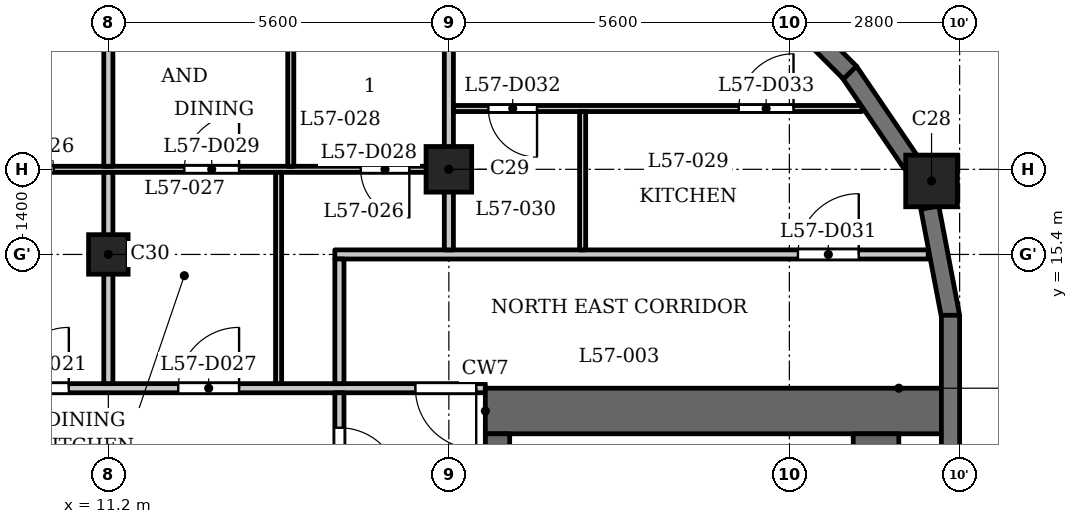
"""IFC4 building model, lengths in metres.
Left out: names, types, materials, properties, quantities, classifications, styles, units other than length and angle.
Written with IfcOpenShell. Run it as: python <this file> out.ifc"""

import sys

from ifc_helpers import new_model, si_unit, direction, frame, frame_2d, origin, origin_2d, place, context, subcontext, project, spatial, rectangle, extrude, element, fill, save


model = new_model("IFC4")
c1 = context("Model", 3, precision=1e-05, world=origin(), true_north=direction((0.0, 1.0)))
c2 = subcontext(c1, "Body", "Model", "MODEL_VIEW")
j1 = project(units=[si_unit("LENGTHUNIT", "METRE"), si_unit("PLANEANGLEUNIT", "RADIAN")], contexts=[c1])
p1 = place(None, origin())
s1 = spatial("IfcSite", under=j1, at=p1, CompositionType="ELEMENT")
p2 = place(p1, origin())
s2 = spatial("IfcBuilding", under=s1, at=p2, CompositionType="ELEMENT")
p3 = place(p2, frame((0.0, 0.0, 220.4)))
s3 = spatial("IfcBuildingStorey", under=s2, at=p3, CompositionType="ELEMENT", Elevation=220.4)
p4 = place(p3, frame((24.738, 16.609, 0.0), z_axis=(0.0, 0.0, 1.0), x_axis=(1.0, 0.0, 0.0)))
e1 = element("IfcColumn", 1, at=p4, inside=s3, PredefinedType="COLUMN", context=c2, shape_type="SweptSolid", body=[
    extrude(rectangle(XDim=0.85, YDim=0.85, at=origin_2d()), origin(), (0.0, 0.0, 1.0), 3.5),
])
p5 = place(p3, frame((16.8, 16.8, 0.0), z_axis=(0.0, 0.0, 1.0), x_axis=(1.0, 0.0, 0.0)))
e2 = element("IfcColumn", 2, at=p5, inside=s3, PredefinedType="COLUMN", context=c2, shape_type="SweptSolid", body=[
    extrude(rectangle(XDim=0.75, YDim=0.75, at=origin_2d()), origin(), (0.0, 0.0, 1.0), 3.5),
])
p6 = place(p3, frame((11.2, 15.4, 0.0), z_axis=(0.0, 0.0, 1.0), x_axis=(1.0, 0.0, 0.0)))
e3 = element("IfcColumn", 3, at=p6, inside=s3, PredefinedType="COLUMN", context=c2, shape_type="SweptSolid", body=[
    extrude(rectangle(XDim=0.65, YDim=0.65, at=origin_2d()), origin(), (0.0, 0.0, 1.0), 3.5),
])
p7 = place(p3, frame((25.05, 11.625, 0.0), z_axis=(0.0, 0.0, 1.0), x_axis=(0.0, 1.0, 0.0)))
e4 = element("IfcWall", 4, at=p7, inside=s3, PredefinedType="SOLIDWALL", context=c2, shape_type="SweptSolid", body=[
    extrude(rectangle(XDim=2.775, YDim=0.3, at=frame_2d((1.387, 0.0))), origin(), (0.0, 0.0, 1.0), 2.5),
])
for number, where, z_axis, x_axis in (
    (5, (25.053, 14.372, 0.0), (0.0, 0.0, 1.0), (-0.187, 0.982, 0.0)),
    (6, (24.408, 16.898, 0.0), (0.0, 0.0, 1.0), (-0.562, 0.827, 0.0)),
):
    element("IfcWall", number, at=place(p3, frame(where, z_axis=z_axis, x_axis=x_axis)), inside=s3, PredefinedType="SOLIDWALL", context=c2, shape_type="SweptSolid", body=[
        extrude(rectangle(XDim=1.831, YDim=0.3, at=frame_2d((0.916, 0.0))), origin(), (0.0, 0.0, 1.0), 2.5),
    ])
p8 = place(p3, frame((23.397, 18.391, 0.0), z_axis=(0.0, 0.0, 1.0), x_axis=(-0.707106781187, 0.707106781187, 0.0)))
e7 = element("IfcWall", 7, at=p8, inside=s3, PredefinedType="SOLIDWALL", context=c2, shape_type="SweptSolid", body=[
    extrude(rectangle(XDim=2.775, YDim=0.3, at=frame_2d((1.388, 0.0))), origin(), (0.0, 0.0, 1.0), 2.5),
])
p9 = place(p8, frame((0.788, 0.0, 0.6)))
e8 = element("IfcOpeningElement", 8, at=p9, cuts=e7, PredefinedType="OPENING", context=c2, shape_type="SweptSolid", body=[
    extrude(rectangle(XDim=1.2, YDim=1.55, at=frame_2d((0.6, 0.775))), frame((0.0, 0.16, 0.0), z_axis=(0.0, -1.0, 0.0), x_axis=(1.0, 0.0, 0.0)), (0.0, 0.0, 1.0), 0.32),
])
p10 = place(p3, frame((17.4, 12.825, 0.0), z_axis=(0.0, 0.0, 1.0), x_axis=(1.0, 0.0, 0.0)))
e9 = element("IfcWall", 9, at=p10, inside=s3, PredefinedType="SHEAR", context=c2, shape_type="SweptSolid", body=[
    extrude(rectangle(XDim=7.6, YDim=0.75, at=frame_2d((3.8, 0.0))), origin(), (0.0, 0.0, 1.0), 3.2),
])
p11 = place(p3, frame((17.6, -12.45, 0.0), z_axis=(0.0, 0.0, 1.0), x_axis=(0.0, 1.0, 0.0)))
e10 = element("IfcWall", 10, at=p11, inside=s3, PredefinedType="SHEAR", context=c2, shape_type="SweptSolid", body=[
    extrude(rectangle(XDim=24.9, YDim=0.4, at=frame_2d((12.45, 0.0))), origin(), (0.0, 0.0, 1.0), 3.2),
])
p12 = place(p11, frame((6.85, 0.0, 0.0)))
e11 = element("IfcOpeningElement", 11, at=p12, cuts=e10, PredefinedType="OPENING", context=c2, shape_type="SweptSolid", body=[
    extrude(rectangle(XDim=0.9, YDim=2.1, at=frame_2d((0.45, 1.05))), frame((0.0, 0.21, 0.0), z_axis=(0.0, -1.0, 0.0), x_axis=(1.0, 0.0, 0.0)), (0.0, 0.0, 1.0), 0.42),
])
p13 = place(p11, frame((10.45, 0.0, 0.0)))
e12 = element("IfcOpeningElement", 12, at=p13, cuts=e10, PredefinedType="OPENING", context=c2, shape_type="SweptSolid", body=[
    extrude(rectangle(XDim=0.9, YDim=2.1, at=frame_2d((0.45, 1.05))), frame((0.0, 0.21, 0.0), z_axis=(0.0, -1.0, 0.0), x_axis=(1.0, 0.0, 0.0)), (0.0, 0.0, 1.0), 0.42),
])
p14 = place(p11, frame((15.6, 0.0, 0.0)))
e13 = element("IfcOpeningElement", 13, at=p14, cuts=e10, PredefinedType="OPENING", context=c2, shape_type="SweptSolid", body=[
    extrude(rectangle(XDim=1.1, YDim=2.1, at=frame_2d((0.55, 1.05))), frame((0.0, 0.21, 0.0), z_axis=(0.0, -1.0, 0.0), x_axis=(1.0, 0.0, 0.0)), (0.0, 0.0, 1.0), 0.42),
])
p15 = place(p11, frame((18.0, 0.0, 0.0)))
e14 = element("IfcOpeningElement", 14, at=p15, cuts=e10, PredefinedType="OPENING", context=c2, shape_type="SweptSolid", body=[
    extrude(rectangle(XDim=1.1, YDim=2.1, at=frame_2d((0.55, 1.05))), frame((0.0, 0.21, 0.0), z_axis=(0.0, -1.0, 0.0), x_axis=(1.0, 0.0, 0.0)), (0.0, 0.0, 1.0), 0.42),
])
p16 = place(p11, frame((23.025, 0.0, 0.0)))
e15 = element("IfcOpeningElement", 15, at=p16, cuts=e10, PredefinedType="OPENING", context=c2, shape_type="SweptSolid", body=[
    extrude(rectangle(XDim=1.1, YDim=2.1, at=frame_2d((0.55, 1.05))), frame((0.0, 0.21, 0.0), z_axis=(0.0, -1.0, 0.0), x_axis=(1.0, 0.0, 0.0)), (0.0, 0.0, 1.0), 0.42),
])
p17 = place(p11, frame((0.775, 0.0, 0.0)))
e16 = element("IfcOpeningElement", 16, at=p17, cuts=e10, PredefinedType="OPENING", context=c2, shape_type="SweptSolid", body=[
    extrude(rectangle(XDim=1.1, YDim=2.1, at=frame_2d((0.55, 1.05))), frame((0.0, 0.21, 0.0), z_axis=(0.0, -1.0, 0.0), x_axis=(1.0, 0.0, 0.0)), (0.0, 0.0, 1.0), 0.42),
])
p18 = place(p11, frame((12.925, 0.0, 0.0)))
e17 = element("IfcOpeningElement", 17, at=p18, cuts=e10, PredefinedType="OPENING", context=c2, shape_type="SweptSolid", body=[
    extrude(rectangle(XDim=1.8, YDim=2.1, at=frame_2d((0.9, 1.05))), frame((0.0, 0.21, 0.0), z_axis=(0.0, -1.0, 0.0), x_axis=(1.0, 0.0, 0.0)), (0.0, 0.0, 1.0), 0.42),
])
p19 = place(p3, frame((23.825, -12.45, 0.0), z_axis=(0.0, 0.0, 1.0), x_axis=(0.0, 1.0, 0.0)))
e18 = element("IfcWall", 18, at=p19, inside=s3, PredefinedType="SHEAR", context=c2, shape_type="SweptSolid", body=[
    extrude(rectangle(XDim=24.9, YDim=0.75, at=frame_2d((12.45, 0.0))), origin(), (0.0, 0.0, 1.0), 3.2),
])
p20 = place(p3, frame((-17.4, 13.2, 0.0), z_axis=(0.0, 0.0, 1.0), x_axis=(1.0, 0.0, 0.0)))
e19 = element("IfcWall", 19, at=p20, inside=s3, PredefinedType="PARTITIONING", context=c2, shape_type="SweptSolid", body=[
    extrude(rectangle(XDim=34.8, YDim=0.15, at=frame_2d((17.4, 0.0))), origin(), (0.0, 0.0, 1.0), 3.2),
])
p21 = place(p20, frame((0.25, 0.0, 0.0)))
e20 = element("IfcOpeningElement", 20, at=p21, cuts=e19, PredefinedType="OPENING", context=c2, shape_type="SweptSolid", body=[
    extrude(rectangle(XDim=1.0, YDim=2.1, at=frame_2d((0.5, 1.05))), frame((0.0, 0.085, 0.0), z_axis=(0.0, -1.0, 0.0), x_axis=(1.0, 0.0, 0.0)), (0.0, 0.0, 1.0), 0.17),
])
p22 = place(p20, frame((33.65, 0.0, 0.0)))
e21 = element("IfcOpeningElement", 21, at=p22, cuts=e19, PredefinedType="OPENING", context=c2, shape_type="SweptSolid", body=[
    extrude(rectangle(XDim=1.0, YDim=2.1, at=frame_2d((0.5, 1.05))), frame((0.0, 0.085, 0.0), z_axis=(0.0, -1.0, 0.0), x_axis=(1.0, 0.0, 0.0)), (0.0, 0.0, 1.0), 0.17),
])
p23 = place(p20, frame((15.75, 0.0, 0.0)))
e22 = element("IfcOpeningElement", 22, at=p23, cuts=e19, PredefinedType="OPENING", context=c2, shape_type="SweptSolid", body=[
    extrude(rectangle(XDim=1.0, YDim=2.1, at=frame_2d((0.5, 1.05))), frame((0.0, 0.085, 0.0), z_axis=(0.0, -1.0, 0.0), x_axis=(1.0, 0.0, 0.0)), (0.0, 0.0, 1.0), 0.17),
])
p24 = place(p20, frame((26.95, 0.0, 0.0)))
e23 = element("IfcOpeningElement", 23, at=p24, cuts=e19, PredefinedType="OPENING", context=c2, shape_type="SweptSolid", body=[
    extrude(rectangle(XDim=1.0, YDim=2.1, at=frame_2d((0.5, 1.05))), frame((0.0, 0.085, 0.0), z_axis=(0.0, -1.0, 0.0), x_axis=(1.0, 0.0, 0.0)), (0.0, 0.0, 1.0), 0.17),
])
p25 = place(p20, frame((29.75, 0.0, 0.0)))
e24 = element("IfcOpeningElement", 24, at=p25, cuts=e19, PredefinedType="OPENING", context=c2, shape_type="SweptSolid", body=[
    extrude(rectangle(XDim=1.0, YDim=2.1, at=frame_2d((0.5, 1.05))), frame((0.0, 0.085, 0.0), z_axis=(0.0, -1.0, 0.0), x_axis=(1.0, 0.0, 0.0)), (0.0, 0.0, 1.0), 0.17),
])
p26 = place(p3, frame((14.925, 15.4, 0.0), z_axis=(0.0, 0.0, 1.0), x_axis=(1.0, 0.0, 0.0)))
e25 = element("IfcWall", 25, at=p26, inside=s3, PredefinedType="PARTITIONING", context=c2, shape_type="SweptSolid", body=[
    extrude(rectangle(XDim=9.759, YDim=0.15, at=frame_2d((4.879, 0.0))), origin(), (0.0, 0.0, 1.0), 3.2),
])
p27 = place(p26, frame((7.616, 0.0, 0.0)))
e26 = element("IfcOpeningElement", 26, at=p27, cuts=e25, PredefinedType="OPENING", context=c2, shape_type="SweptSolid", body=[
    extrude(rectangle(XDim=1.0, YDim=2.1, at=frame_2d((0.5, 1.05))), frame((0.0, 0.085, 0.0), z_axis=(0.0, -1.0, 0.0), x_axis=(1.0, 0.0, 0.0)), (0.0, 0.0, 1.0), 0.17),
])
p28 = place(p3, frame((-16.725, 16.8, 0.0), z_axis=(0.0, 0.0, 1.0), x_axis=(1.0, 0.0, 0.0)))
e27 = element("IfcWall", 27, at=p28, inside=s3, PredefinedType="PARTITIONING", context=c2, shape_type="SweptSolid", body=[
    extrude(rectangle(XDim=33.45, YDim=0.1, at=frame_2d((16.725, 0.0))), origin(), (0.0, 0.0, 1.0), 3.2),
])
p29 = place(p28, frame((11.675, 0.0, 0.0)))
e28 = element("IfcOpeningElement", 28, at=p29, cuts=e27, PredefinedType="OPENING", context=c2, shape_type="SweptSolid", body=[
    extrude(rectangle(XDim=0.9, YDim=2.1, at=frame_2d((0.45, 1.05))), frame((0.0, 0.06, 0.0), z_axis=(0.0, -1.0, 0.0), x_axis=(1.0, 0.0, 0.0)), (0.0, 0.0, 1.0), 0.12),
])
p30 = place(p28, frame((9.575, 0.0, 0.0)))
e29 = element("IfcOpeningElement", 29, at=p30, cuts=e27, PredefinedType="OPENING", context=c2, shape_type="SweptSolid", body=[
    extrude(rectangle(XDim=0.9, YDim=2.1, at=frame_2d((0.45, 1.05))), frame((0.0, 0.06, 0.0), z_axis=(0.0, -1.0, 0.0), x_axis=(1.0, 0.0, 0.0)), (0.0, 0.0, 1.0), 0.12),
])
p31 = place(p28, frame((17.375, 0.0, 0.0)))
e30 = element("IfcOpeningElement", 30, at=p31, cuts=e27, PredefinedType="OPENING", context=c2, shape_type="SweptSolid", body=[
    extrude(rectangle(XDim=0.8, YDim=2.1, at=frame_2d((0.4, 1.05))), frame((0.0, 0.06, 0.0), z_axis=(0.0, -1.0, 0.0), x_axis=(1.0, 0.0, 0.0)), (0.0, 0.0, 1.0), 0.12),
])
p32 = place(p28, frame((19.525, 0.0, 0.0)))
e31 = element("IfcOpeningElement", 31, at=p32, cuts=e27, PredefinedType="OPENING", context=c2, shape_type="SweptSolid", body=[
    extrude(rectangle(XDim=0.9, YDim=2.1, at=frame_2d((0.45, 1.05))), frame((0.0, 0.06, 0.0), z_axis=(0.0, -1.0, 0.0), x_axis=(1.0, 0.0, 0.0)), (0.0, 0.0, 1.0), 0.12),
])
p33 = place(p28, frame((23.775, 0.0, 0.0)))
e32 = element("IfcOpeningElement", 32, at=p33, cuts=e27, PredefinedType="OPENING", context=c2, shape_type="SweptSolid", body=[
    extrude(rectangle(XDim=0.9, YDim=2.1, at=frame_2d((0.45, 1.05))), frame((0.0, 0.06, 0.0), z_axis=(0.0, -1.0, 0.0), x_axis=(1.0, 0.0, 0.0)), (0.0, 0.0, 1.0), 0.12),
])
p34 = place(p28, frame((26.125, 0.0, 0.0)))
e33 = element("IfcOpeningElement", 33, at=p34, cuts=e27, PredefinedType="OPENING", context=c2, shape_type="SweptSolid", body=[
    extrude(rectangle(XDim=0.9, YDim=2.1, at=frame_2d((0.45, 1.05))), frame((0.0, 0.06, 0.0), z_axis=(0.0, -1.0, 0.0), x_axis=(1.0, 0.0, 0.0)), (0.0, 0.0, 1.0), 0.12),
])
p35 = place(p28, frame((32.075, 0.0, 0.0)))
e34 = element("IfcOpeningElement", 34, at=p35, cuts=e27, PredefinedType="OPENING", context=c2, shape_type="SweptSolid", body=[
    extrude(rectangle(XDim=0.8, YDim=2.1, at=frame_2d((0.4, 1.05))), frame((0.0, 0.06, 0.0), z_axis=(0.0, -1.0, 0.0), x_axis=(1.0, 0.0, 0.0)), (0.0, 0.0, 1.0), 0.12),
])
p36 = place(p28, frame((29.175, 0.0, 0.0)))
e35 = element("IfcOpeningElement", 35, at=p36, cuts=e27, PredefinedType="OPENING", context=c2, shape_type="SweptSolid", body=[
    extrude(rectangle(XDim=0.9, YDim=2.1, at=frame_2d((0.45, 1.05))), frame((0.0, 0.06, 0.0), z_axis=(0.0, -1.0, 0.0), x_axis=(1.0, 0.0, 0.0)), (0.0, 0.0, 1.0), 0.12),
])
p37 = place(p3, frame((16.875, 17.8, 0.0), z_axis=(0.0, 0.0, 1.0), x_axis=(1.0, 0.0, 0.0)))
e36 = element("IfcWall", 36, at=p37, inside=s3, PredefinedType="PARTITIONING", context=c2, shape_type="SweptSolid", body=[
    extrude(rectangle(XDim=6.719, YDim=0.1, at=frame_2d((3.359, 0.0))), origin(), (0.0, 0.0, 1.0), 3.2),
])
p38 = place(p37, frame((0.575, 0.0, 0.0)))
e37 = element("IfcOpeningElement", 37, at=p38, cuts=e36, PredefinedType="OPENING", context=c2, shape_type="SweptSolid", body=[
    extrude(rectangle(XDim=0.8, YDim=2.1, at=frame_2d((0.4, 1.05))), frame((0.0, 0.06, 0.0), z_axis=(0.0, -1.0, 0.0), x_axis=(1.0, 0.0, 0.0)), (0.0, 0.0, 1.0), 0.12),
])
p39 = place(p37, frame((4.693, 0.0, 0.0)))
e38 = element("IfcOpeningElement", 38, at=p39, cuts=e36, PredefinedType="OPENING", context=c2, shape_type="SweptSolid", body=[
    extrude(rectangle(XDim=0.9, YDim=2.1, at=frame_2d((0.45, 1.05))), frame((0.0, 0.06, 0.0), z_axis=(0.0, -1.0, 0.0), x_axis=(1.0, 0.0, 0.0)), (0.0, 0.0, 1.0), 0.12),
])
p40 = place(p3, frame((11.2, 13.275, 0.0), z_axis=(0.0, 0.0, 1.0), x_axis=(0.0, 1.0, 0.0)))
e39 = element("IfcWall", 39, at=p40, inside=s3, PredefinedType="PARTITIONING", context=c2, shape_type="SweptSolid", body=[
    extrude(rectangle(XDim=3.475, YDim=0.15, at=frame_2d((1.738, 0.0))), origin(), (0.0, 0.0, 1.0), 3.2),
])
p41 = place(p3, frame((11.2, 16.85, 0.0), z_axis=(0.0, 0.0, 1.0), x_axis=(0.0, 1.0, 0.0)))
e40 = element("IfcWall", 40, at=p41, inside=s3, PredefinedType="PARTITIONING", context=c2, shape_type="SweptSolid", body=[
    extrude(rectangle(XDim=5.23, YDim=0.15, at=frame_2d((2.615, 0.0))), origin(), (0.0, 0.0, 1.0), 3.2),
])
p42 = place(p3, frame((14.0, 13.275, 0.0), z_axis=(0.0, 0.0, 1.0), x_axis=(0.0, 1.0, 0.0)))
e41 = element("IfcWall", 41, at=p42, inside=s3, PredefinedType="PARTITIONING", context=c2, shape_type="SweptSolid", body=[
    extrude(rectangle(XDim=3.475, YDim=0.1, at=frame_2d((1.738, 0.0))), origin(), (0.0, 0.0, 1.0), 3.2),
])
p43 = place(p3, frame((14.2, 16.85, 0.0), z_axis=(0.0, 0.0, 1.0), x_axis=(0.0, 1.0, 0.0)))
e42 = element("IfcWall", 42, at=p43, inside=s3, PredefinedType="PARTITIONING", context=c2, shape_type="SweptSolid", body=[
    extrude(rectangle(XDim=5.46, YDim=0.1, at=frame_2d((2.73, 0.0))), origin(), (0.0, 0.0, 1.0), 3.2),
])
p44 = place(p43, frame((3.85, 0.0, 0.0)))
e43 = element("IfcOpeningElement", 43, at=p44, cuts=e42, PredefinedType="OPENING", context=c2, shape_type="SweptSolid", body=[
    extrude(rectangle(XDim=0.9, YDim=2.1, at=frame_2d((0.45, 1.05))), frame((0.0, 0.06, 0.0), z_axis=(0.0, -1.0, 0.0), x_axis=(1.0, 0.0, 0.0)), (0.0, 0.0, 1.0), 0.12),
])
p45 = place(p3, frame((15.0, 6.769, 0.0), z_axis=(0.0, 0.0, 1.0), x_axis=(0.0, 1.0, 0.0)))
e44 = element("IfcWall", 44, at=p45, inside=s3, PredefinedType="PARTITIONING", context=c2, shape_type="SweptSolid", body=[
    extrude(rectangle(XDim=6.356, YDim=0.15, at=frame_2d((3.178, 0.0))), origin(), (0.0, 0.0, 1.0), 3.2),
])
p46 = place(p45, frame((4.781, 0.0, 0.0)))
e45 = element("IfcOpeningElement", 45, at=p46, cuts=e44, PredefinedType="OPENING", context=c2, shape_type="SweptSolid", body=[
    extrude(rectangle(XDim=1.0, YDim=2.1, at=frame_2d((0.5, 1.05))), frame((0.0, 0.085, 0.0), z_axis=(0.0, -1.0, 0.0), x_axis=(1.0, 0.0, 0.0)), (0.0, 0.0, 1.0), 0.17),
])
p47 = place(p3, frame((15.0, 13.275, 0.0), z_axis=(0.0, 0.0, 1.0), x_axis=(0.0, 1.0, 0.0)))
e46 = element("IfcWall", 46, at=p47, inside=s3, PredefinedType="PARTITIONING", context=c2, shape_type="SweptSolid", body=[
    extrude(rectangle(XDim=2.05, YDim=0.15, at=frame_2d((1.025, 0.0))), origin(), (0.0, 0.0, 1.0), 3.2),
])
p48 = place(p3, frame((16.8, 15.475, 0.0), z_axis=(0.0, 0.0, 1.0), x_axis=(0.0, 1.0, 0.0)))
e47 = element("IfcWall", 47, at=p48, inside=s3, PredefinedType="PARTITIONING", context=c2, shape_type="SweptSolid", body=[
    extrude(rectangle(XDim=6.835, YDim=0.15, at=frame_2d((3.417, 0.0))), origin(), (0.0, 0.0, 1.0), 2.55),
])
p49 = place(p3, frame((19.0, 15.475, 0.0), z_axis=(0.0, 0.0, 1.0), x_axis=(0.0, 1.0, 0.0)))
e48 = element("IfcWall", 48, at=p49, inside=s3, PredefinedType="PARTITIONING", context=c2, shape_type="SweptSolid", body=[
    extrude(rectangle(XDim=2.275, YDim=0.1, at=frame_2d((1.137, 0.0))), origin(), (0.0, 0.0, 1.0), 3.2),
])
p50 = place(p46, origin())
e49 = element("IfcDoor", 49, at=p50, inside=s3, OperationType="SINGLE_SWING_LEFT", PredefinedType="DOOR", context=c2, shape_type="SweptSolid", body=[
    extrude(rectangle(XDim=1.0, YDim=2.1, at=frame_2d((0.5, 1.05))), frame((0.0, 0.025, 0.0), z_axis=(0.0, -1.0, 0.0), x_axis=(1.0, 0.0, 0.0)), (0.0, 0.0, 1.0), 0.05),
])
fill(e45, e49)
p51 = place(p22, origin())
e50 = element("IfcDoor", 50, at=p51, inside=s3, OperationType="SINGLE_SWING_RIGHT", PredefinedType="DOOR", context=c2, shape_type="SweptSolid", body=[
    extrude(rectangle(XDim=1.0, YDim=2.1, at=frame_2d((0.5, 1.05))), frame((0.0, 0.025, 0.0), z_axis=(0.0, -1.0, 0.0), x_axis=(1.0, 0.0, 0.0)), (0.0, 0.0, 1.0), 0.05),
])
fill(e21, e50)
p52 = place(p24, origin())
e51 = element("IfcDoor", 51, at=p52, inside=s3, OperationType="SINGLE_SWING_LEFT", PredefinedType="DOOR", context=c2, shape_type="SweptSolid", body=[
    extrude(rectangle(XDim=1.0, YDim=2.1, at=frame_2d((0.5, 1.05))), frame((0.0, 0.025, 0.0), z_axis=(0.0, -1.0, 0.0), x_axis=(1.0, 0.0, 0.0)), (0.0, 0.0, 1.0), 0.05),
])
fill(e23, e51)
p53 = place(p34, origin())
e52 = element("IfcDoor", 52, at=p53, inside=s3, OperationType="SINGLE_SWING_RIGHT", PredefinedType="DOOR", context=c2, shape_type="SweptSolid", body=[
    extrude(rectangle(XDim=0.9, YDim=2.1, at=frame_2d((0.45, 1.05))), frame((0.0, 0.025, 0.0), z_axis=(0.0, -1.0, 0.0), x_axis=(1.0, 0.0, 0.0)), (0.0, 0.0, 1.0), 0.05),
])
fill(e33, e52)
p54 = place(p25, origin())
e53 = element("IfcDoor", 53, at=p54, inside=s3, OperationType="SINGLE_SWING_LEFT", PredefinedType="DOOR", context=c2, shape_type="SweptSolid", body=[
    extrude(rectangle(XDim=1.0, YDim=2.1, at=frame_2d((0.5, 1.05))), frame((0.0, 0.025, 0.0), z_axis=(0.0, -1.0, 0.0), x_axis=(1.0, 0.0, 0.0)), (0.0, 0.0, 1.0), 0.05),
])
fill(e24, e53)
p55 = place(p35, origin())
e54 = element("IfcDoor", 54, at=p55, inside=s3, OperationType="SINGLE_SWING_RIGHT", PredefinedType="DOOR", context=c2, shape_type="SweptSolid", body=[
    extrude(rectangle(XDim=0.8, YDim=2.1, at=frame_2d((0.4, 1.05))), frame((0.0, 0.025, 0.0), z_axis=(0.0, -1.0, 0.0), x_axis=(1.0, 0.0, 0.0)), (0.0, 0.0, 1.0), 0.05),
])
fill(e34, e54)
p56 = place(p36, origin())
e55 = element("IfcDoor", 55, at=p56, inside=s3, OperationType="SINGLE_SWING_LEFT", PredefinedType="DOOR", context=c2, shape_type="SweptSolid", body=[
    extrude(rectangle(XDim=0.9, YDim=2.1, at=frame_2d((0.45, 1.05))), frame((0.0, 0.025, 0.0), z_axis=(0.0, -1.0, 0.0), x_axis=(1.0, 0.0, 0.0)), (0.0, 0.0, 1.0), 0.05),
])
fill(e35, e55)
p57 = place(p27, origin())
e56 = element("IfcDoor", 56, at=p57, inside=s3, OperationType="SINGLE_SWING_LEFT", PredefinedType="DOOR", context=c2, shape_type="SweptSolid", body=[
    extrude(rectangle(XDim=1.0, YDim=2.1, at=frame_2d((0.5, 1.05))), frame((0.0, 0.025, 0.0), z_axis=(0.0, -1.0, 0.0), x_axis=(1.0, 0.0, 0.0)), (0.0, 0.0, 1.0), 0.05),
])
fill(e26, e56)
p58 = place(p38, origin())
e57 = element("IfcDoor", 57, at=p58, inside=s3, OperationType="SINGLE_SWING_RIGHT", PredefinedType="DOOR", context=c2, shape_type="SweptSolid", body=[
    extrude(rectangle(XDim=0.8, YDim=2.1, at=frame_2d((0.4, 1.05))), frame((0.0, 0.025, 0.0), z_axis=(0.0, -1.0, 0.0), x_axis=(1.0, 0.0, 0.0)), (0.0, 0.0, 1.0), 0.05),
])
fill(e37, e57)
p59 = place(p39, origin())
e58 = element("IfcDoor", 58, at=p59, inside=s3, OperationType="SINGLE_SWING_LEFT", PredefinedType="DOOR", context=c2, shape_type="SweptSolid", body=[
    extrude(rectangle(XDim=0.9, YDim=2.1, at=frame_2d((0.45, 1.05))), frame((0.0, 0.025, 0.0), z_axis=(0.0, -1.0, 0.0), x_axis=(1.0, 0.0, 0.0)), (0.0, 0.0, 1.0), 0.05),
])
fill(e38, e58)
save(model, sys.argv[1])
